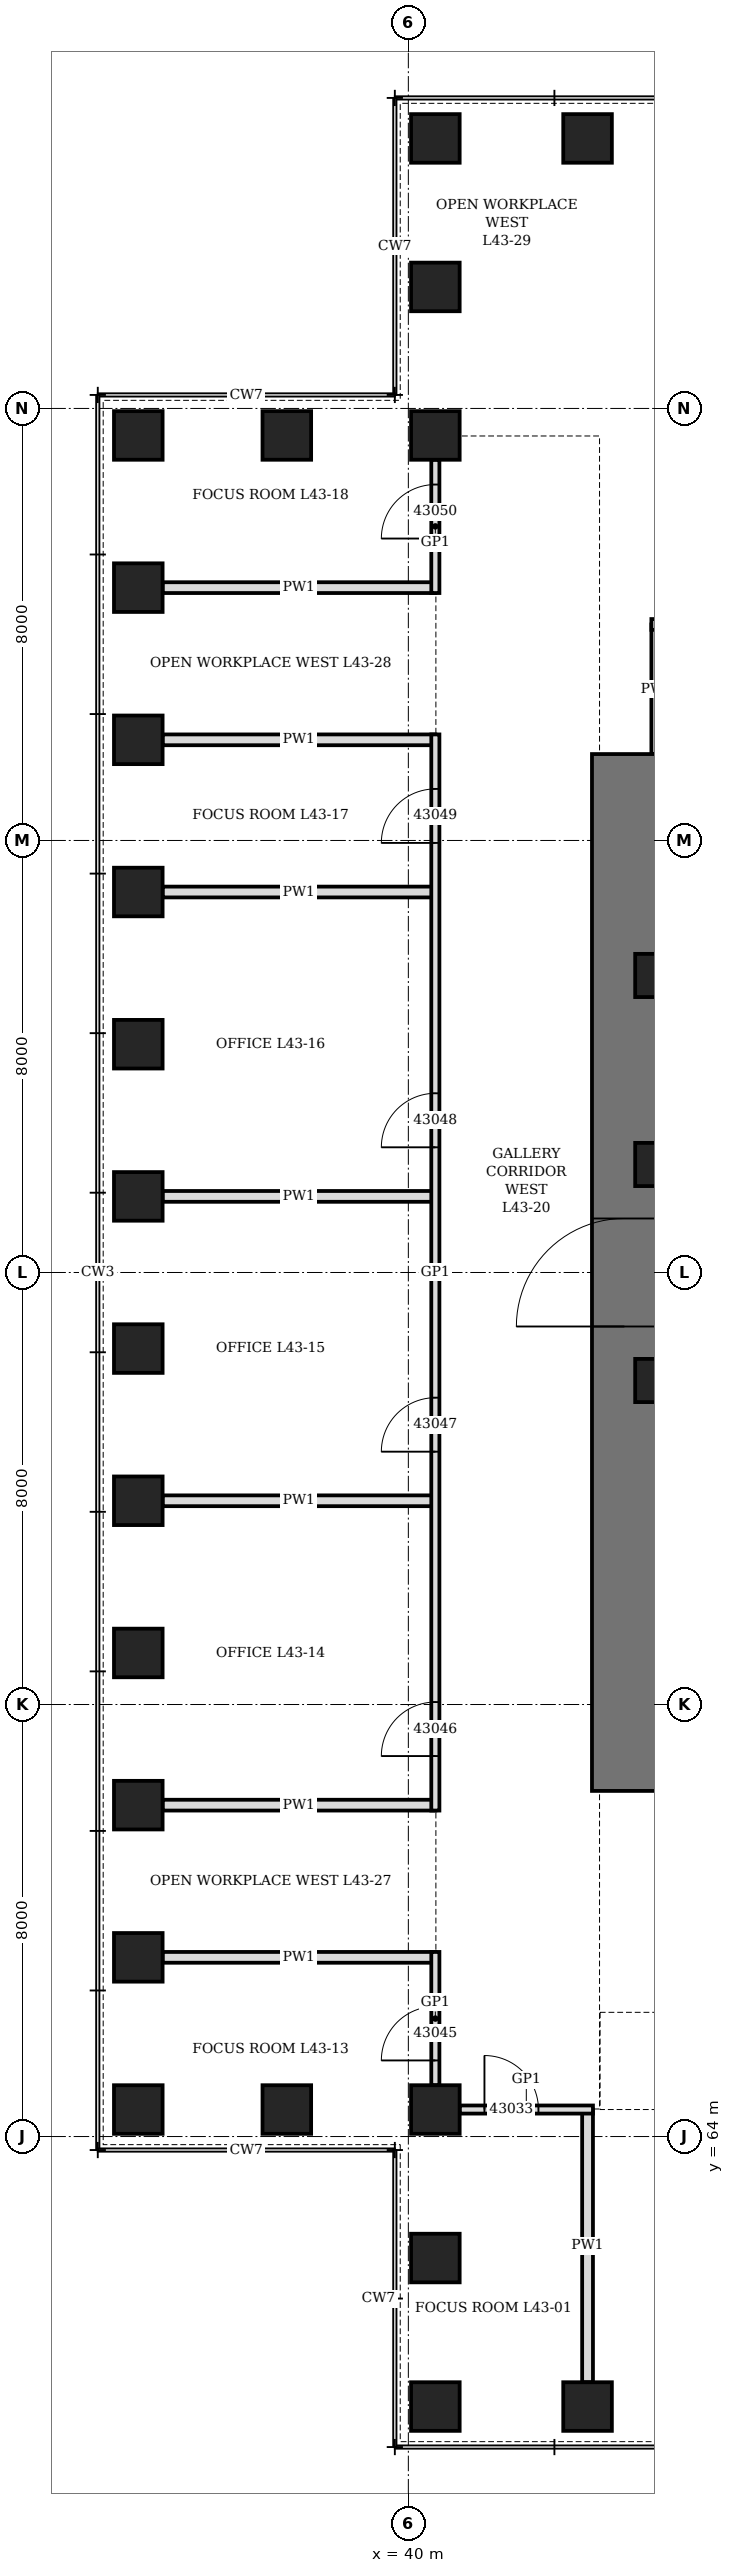
"""IFC4 building model, lengths in metres.
Left out: names, types, materials, properties, quantities, classifications, styles, units other than length and angle.
Written with IfcOpenShell. Run it as: python <this file> out.ifc"""

import sys

from ifc_helpers import new_model, si_unit, direction, frame, frame_2d, origin, origin_2d, place, context, subcontext, project, spatial, rectangle, hollow_rectangle, extrude, element, fill, save


model = new_model("IFC4")
c1 = context("Model", 3, precision=1e-05, world=origin(), true_north=direction((0.0, 1.0)))
c2 = subcontext(c1, "Body", "Model", "MODEL_VIEW")
j1 = project(units=[si_unit("LENGTHUNIT", "METRE"), si_unit("PLANEANGLEUNIT", "RADIAN")], contexts=[c1])
p1 = place(None, origin())
s1 = spatial("IfcSite", under=j1, at=p1, CompositionType="ELEMENT")
p2 = place(p1, origin())
s2 = spatial("IfcBuilding", under=s1, at=p2, CompositionType="ELEMENT")
p3 = place(p2, frame((0.0, 0.0, 193.9)))
s3 = spatial("IfcBuildingStorey", under=s2, at=p3, CompositionType="ELEMENT", Elevation=193.9)
for number, where, z_axis, x_axis in (
    (1, (40.5, 59.0, 0.0), (0.0, 0.0, 1.0), (1.0, 0.0, 0.0)),
    (2, (43.318, 59.0, 0.0), (0.0, 0.0, 1.0), (1.0, 0.0, 0.0)),
    (3, (43.318, 101.0, 0.0), (0.0, 0.0, 1.0), (1.0, 0.0, 0.0)),
    (4, (40.5, 101.0, 0.0), (0.0, 0.0, 1.0), (0.0, 1.0, 0.0)),
    (5, (40.5, 98.25, 0.0), (0.0, 0.0, 1.0), (0.0, 1.0, 0.0)),
    (6, (40.5, 95.5, 0.0), (0.0, 0.0, 1.0), (1.0, 0.0, 0.0)),
    (7, (37.75, 95.5, 0.0), (0.0, 0.0, 1.0), (1.0, 0.0, 0.0)),
    (8, (35.0, 95.5, 0.0), (0.0, 0.0, 1.0), (0.0, 1.0, 0.0)),
    (9, (35.0, 92.682, 0.0), (0.0, 0.0, 1.0), (0.0, 1.0, 0.0)),
    (10, (35.0, 89.864, 0.0), (0.0, 0.0, 1.0), (0.0, 1.0, 0.0)),
    (11, (35.0, 87.045, 0.0), (0.0, 0.0, 1.0), (0.0, 1.0, 0.0)),
    (12, (35.0, 84.227, 0.0), (0.0, 0.0, 1.0), (0.0, 1.0, 0.0)),
    (13, (35.0, 81.409, 0.0), (0.0, 0.0, 1.0), (0.0, 1.0, 0.0)),
    (14, (35.0, 78.591, 0.0), (0.0, 0.0, 1.0), (0.0, 1.0, 0.0)),
    (15, (35.0, 75.773, 0.0), (0.0, 0.0, 1.0), (0.0, 1.0, 0.0)),
    (16, (35.0, 72.955, 0.0), (0.0, 0.0, 1.0), (0.0, 1.0, 0.0)),
    (17, (35.0, 70.136, 0.0), (0.0, 0.0, 1.0), (0.0, 1.0, 0.0)),
    (18, (35.0, 67.318, 0.0), (0.0, 0.0, 1.0), (0.0, 1.0, 0.0)),
    (19, (35.0, 64.5, 0.0), (0.0, 0.0, 1.0), (1.0, 0.0, 0.0)),
    (20, (37.75, 64.5, 0.0), (0.0, 0.0, 1.0), (1.0, 0.0, 0.0)),
    (21, (40.5, 64.5, 0.0), (0.0, 0.0, 1.0), (0.0, 1.0, 0.0)),
    (22, (40.5, 61.75, 0.0), (0.0, 0.0, 1.0), (0.0, 1.0, 0.0)),
):
    element("IfcColumn", number, at=place(p3, frame(where, z_axis=z_axis, x_axis=x_axis)), inside=s3, PredefinedType="COLUMN", context=c2, shape_type="SweptSolid", body=[
        extrude(hollow_rectangle(XDim=0.9, YDim=0.9, WallThickness=0.12, at=origin_2d()), origin(), (0.0, 0.0, 1.0), 4.2),
    ])
p4 = place(p3, frame((44.0, 70.4, 0.0), z_axis=(0.0, 0.0, 1.0), x_axis=(0.0, 1.0, 0.0)))
e23 = element("IfcWall", 23, at=p4, inside=s3, PredefinedType="SHEAR", context=c2, shape_type="SweptSolid", body=[
    extrude(rectangle(XDim=19.2, YDim=1.2, at=frame_2d((9.6, 0.0))), origin(), (0.0, 0.0, 1.0), 4.2),
])
p5 = place(p4, frame((8.6, 0.0, 0.0)))
e24 = element("IfcOpeningElement", 24, at=p5, cuts=e23, PredefinedType="OPENING", context=c2, shape_type="SweptSolid", body=[
    extrude(rectangle(XDim=2.0, YDim=2.4, at=frame_2d((1.0, 1.2))), frame((0.0, 0.61, 0.0), z_axis=(0.0, -1.0, 0.0), x_axis=(1.0, 0.0, 0.0)), (0.0, 0.0, 1.0), 1.22),
])
for number, where, z_axis, x_axis in (
    (25, (44.6, 78.0, 0.0), (0.0, 0.0, 1.0), (1.0, 0.0, 0.0)),
    (26, (44.6, 82.0, 0.0), (0.0, 0.0, 1.0), (1.0, 0.0, 0.0)),
    (27, (44.6, 85.5, 0.0), (0.0, 0.0, 1.0), (1.0, 0.0, 0.0)),
):
    element("IfcColumn", number, at=place(p3, frame(where, z_axis=z_axis, x_axis=x_axis)), inside=s3, PredefinedType="COLUMN", context=c2, shape_type="SweptSolid", body=[
        extrude(hollow_rectangle(XDim=0.8, YDim=0.8, WallThickness=0.1, at=origin_2d()), origin(), (0.0, 0.0, 1.0), 4.2),
    ])
for number, where, z_axis, x_axis in (
    (28, (43.318, 59.45, 0.0), (0.0, 0.0, 1.0), (0.0, 1.0, 0.0)),
    (29, (35.45, 67.318, 0.0), (0.0, 0.0, 1.0), (1.0, 0.0, 0.0)),
    (30, (35.45, 70.136, 0.0), (0.0, 0.0, 1.0), (1.0, 0.0, 0.0)),
    (31, (35.45, 75.773, 0.0), (0.0, 0.0, 1.0), (1.0, 0.0, 0.0)),
    (32, (35.45, 81.409, 0.0), (0.0, 0.0, 1.0), (1.0, 0.0, 0.0)),
    (33, (35.45, 87.045, 0.0), (0.0, 0.0, 1.0), (1.0, 0.0, 0.0)),
    (34, (35.45, 89.864, 0.0), (0.0, 0.0, 1.0), (1.0, 0.0, 0.0)),
    (35, (35.45, 92.682, 0.0), (0.0, 0.0, 1.0), (1.0, 0.0, 0.0)),
):
    element("IfcWall", number, at=place(p3, frame(where, z_axis=z_axis, x_axis=x_axis)), inside=s3, PredefinedType="PARTITIONING", context=c2, shape_type="SweptSolid", body=[
        extrude(rectangle(XDim=5.05, YDim=0.2, at=frame_2d((2.525, 0.0))), origin(), (0.0, 0.0, 1.0), 3.428),
    ])
p6 = place(p3, frame((44.6, 89.6, 0.0), z_axis=(0.0, 0.0, 1.0), x_axis=(0.0, 1.0, 0.0)))
e36 = element("IfcWall", 36, at=p6, inside=s3, PredefinedType="PARTITIONING", context=c2, shape_type="SweptSolid", body=[
    extrude(rectangle(XDim=2.4, YDim=0.2, at=frame_2d((1.2, 0.0))), origin(), (0.0, 0.0, 1.0), 4.04),
])
p7 = place(p3, frame((40.95, 64.5, 0.0), z_axis=(0.0, 0.0, 1.0), x_axis=(1.0, 0.0, 0.0)))
e37 = element("IfcWall", 37, at=p7, inside=s3, PredefinedType="PARTITIONING", context=c2, shape_type="SweptSolid", body=[
    extrude(rectangle(XDim=2.468, YDim=0.15, at=frame_2d((1.234, 0.0))), origin(), (0.0, 0.0, 1.0), 4.04),
])
p8 = place(p7, frame((0.459, 0.0, 0.0)))
e38 = element("IfcOpeningElement", 38, at=p8, cuts=e37, PredefinedType="OPENING", context=c2, shape_type="SweptSolid", body=[
    extrude(rectangle(XDim=1.0, YDim=2.4, at=frame_2d((0.5, 1.2))), frame((0.0, 0.085, 0.0), z_axis=(0.0, -1.0, 0.0), x_axis=(1.0, 0.0, 0.0)), (0.0, 0.0, 1.0), 0.17),
])
p9 = place(p3, frame((44.5, 92.0, 0.0), z_axis=(0.0, 0.0, 1.0), x_axis=(1.0, 0.0, 0.0)))
e39 = element("IfcWall", 39, at=p9, inside=s3, PredefinedType="PARTITIONING", context=c2, shape_type="SweptSolid", body=[
    extrude(rectangle(XDim=6.4, YDim=0.2, at=frame_2d((3.2, 0.0))), origin(), (0.0, 0.0, 1.0), 4.04),
])
p10 = place(p9, frame((2.7, 0.0, 0.0)))
e40 = element("IfcOpeningElement", 40, at=p10, cuts=e39, PredefinedType="OPENING", context=c2, shape_type="SweptSolid", body=[
    extrude(rectangle(XDim=1.0, YDim=2.1, at=frame_2d((0.5, 1.05))), frame((0.0, 0.11, 0.0), z_axis=(0.0, -1.0, 0.0), x_axis=(1.0, 0.0, 0.0)), (0.0, 0.0, 1.0), 0.22),
])
p11 = place(p3, frame((40.5, 64.95, 0.0), z_axis=(0.0, 0.0, 1.0), x_axis=(0.0, 1.0, 0.0)))
e41 = element("IfcWall", 41, at=p11, inside=s3, PredefinedType="PARTITIONING", context=c2, shape_type="SweptSolid", body=[
    extrude(rectangle(XDim=2.468, YDim=0.15, at=frame_2d((1.234, 0.0))), origin(), (0.0, 0.0, 1.0), 4.04),
])
p12 = place(p11, frame((0.459, 0.0, 0.0)))
e42 = element("IfcOpeningElement", 42, at=p12, cuts=e41, PredefinedType="OPENING", context=c2, shape_type="SweptSolid", body=[
    extrude(rectangle(XDim=1.0, YDim=2.4, at=frame_2d((0.5, 1.2))), frame((0.0, 0.085, 0.0), z_axis=(0.0, -1.0, 0.0), x_axis=(1.0, 0.0, 0.0)), (0.0, 0.0, 1.0), 0.17),
])
p13 = place(p3, frame((40.5, 70.036, 0.0), z_axis=(0.0, 0.0, 1.0), x_axis=(0.0, 1.0, 0.0)))
e43 = element("IfcWall", 43, at=p13, inside=s3, PredefinedType="PARTITIONING", context=c2, shape_type="SweptSolid", body=[
    extrude(rectangle(XDim=19.927, YDim=0.15, at=frame_2d((9.964, 0.0))), origin(), (0.0, 0.0, 1.0), 4.04),
])
p14 = place(p13, frame((1.009, 0.0, 0.0)))
e44 = element("IfcOpeningElement", 44, at=p14, cuts=e43, PredefinedType="OPENING", context=c2, shape_type="SweptSolid", body=[
    extrude(rectangle(XDim=1.0, YDim=2.1, at=frame_2d((0.5, 1.05))), frame((0.0, 0.085, 0.0), z_axis=(0.0, -1.0, 0.0), x_axis=(1.0, 0.0, 0.0)), (0.0, 0.0, 1.0), 0.17),
])
p15 = place(p13, frame((6.646, 0.0, 0.0)))
e45 = element("IfcOpeningElement", 45, at=p15, cuts=e43, PredefinedType="OPENING", context=c2, shape_type="SweptSolid", body=[
    extrude(rectangle(XDim=1.0, YDim=2.1, at=frame_2d((0.5, 1.05))), frame((0.0, 0.085, 0.0), z_axis=(0.0, -1.0, 0.0), x_axis=(1.0, 0.0, 0.0)), (0.0, 0.0, 1.0), 0.17),
])
p16 = place(p13, frame((12.282, 0.0, 0.0)))
e46 = element("IfcOpeningElement", 46, at=p16, cuts=e43, PredefinedType="OPENING", context=c2, shape_type="SweptSolid", body=[
    extrude(rectangle(XDim=1.0, YDim=2.1, at=frame_2d((0.5, 1.05))), frame((0.0, 0.085, 0.0), z_axis=(0.0, -1.0, 0.0), x_axis=(1.0, 0.0, 0.0)), (0.0, 0.0, 1.0), 0.17),
])
p17 = place(p13, frame((17.918, 0.0, 0.0)))
e47 = element("IfcOpeningElement", 47, at=p17, cuts=e43, PredefinedType="OPENING", context=c2, shape_type="SweptSolid", body=[
    extrude(rectangle(XDim=1.0, YDim=2.4, at=frame_2d((0.5, 1.2))), frame((0.0, 0.085, 0.0), z_axis=(0.0, -1.0, 0.0), x_axis=(1.0, 0.0, 0.0)), (0.0, 0.0, 1.0), 0.17),
])
p18 = place(p3, frame((40.5, 92.582, 0.0), z_axis=(0.0, 0.0, 1.0), x_axis=(0.0, 1.0, 0.0)))
e48 = element("IfcWall", 48, at=p18, inside=s3, PredefinedType="PARTITIONING", context=c2, shape_type="SweptSolid", body=[
    extrude(rectangle(XDim=2.468, YDim=0.15, at=frame_2d((1.234, 0.0))), origin(), (0.0, 0.0, 1.0), 4.04),
])
p19 = place(p18, frame((1.009, 0.0, 0.0)))
e49 = element("IfcOpeningElement", 49, at=p19, cuts=e48, PredefinedType="OPENING", context=c2, shape_type="SweptSolid", body=[
    extrude(rectangle(XDim=1.0, YDim=2.4, at=frame_2d((0.5, 1.2))), frame((0.0, 0.085, 0.0), z_axis=(0.0, -1.0, 0.0), x_axis=(1.0, 0.0, 0.0)), (0.0, 0.0, 1.0), 0.17),
])
p20 = place(p5, origin())
e50 = element("IfcDoor", 50, at=p20, inside=s3, OperationType="DOUBLE_DOOR_SINGLE_SWING", PredefinedType="DOOR", context=c2, shape_type="SweptSolid", body=[
    extrude(rectangle(XDim=2.0, YDim=2.4, at=frame_2d((1.0, 1.2))), frame((0.0, 0.35, 0.0), z_axis=(0.0, -1.0, 0.0), x_axis=(1.0, 0.0, 0.0)), (0.0, 0.0, 1.0), 0.7),
])
fill(e24, e50)
p21 = place(p8, origin())
e51 = element("IfcDoor", 51, at=p21, inside=s3, OperationType="SINGLE_SWING_RIGHT", PredefinedType="DOOR", context=c2, shape_type="SweptSolid", body=[
    extrude(rectangle(XDim=1.0, YDim=2.4, at=frame_2d((0.5, 1.2))), frame((0.0, 0.075, 0.0), z_axis=(0.0, -1.0, 0.0), x_axis=(1.0, 0.0, 0.0)), (0.0, 0.0, 1.0), 0.149),
])
fill(e38, e51)
p22 = place(p12, origin())
e52 = element("IfcDoor", 52, at=p22, inside=s3, OperationType="SINGLE_SWING_RIGHT", PredefinedType="DOOR", context=c2, shape_type="SweptSolid", body=[
    extrude(rectangle(XDim=1.0, YDim=2.4, at=frame_2d((0.5, 1.2))), frame((0.0, 0.075, 0.0), z_axis=(0.0, -1.0, 0.0), x_axis=(1.0, 0.0, 0.0)), (0.0, 0.0, 1.0), 0.149),
])
fill(e42, e52)
p23 = place(p14, origin())
e53 = element("IfcDoor", 53, at=p23, inside=s3, OperationType="SINGLE_SWING_LEFT", PredefinedType="DOOR", context=c2, shape_type="SweptSolid", body=[
    extrude(rectangle(XDim=1.0, YDim=2.1, at=frame_2d((0.5, 1.05))), frame((0.0, 0.075, 0.0), z_axis=(0.0, -1.0, 0.0), x_axis=(1.0, 0.0, 0.0)), (0.0, 0.0, 1.0), 0.149),
])
fill(e44, e53)
p24 = place(p15, origin())
e54 = element("IfcDoor", 54, at=p24, inside=s3, OperationType="SINGLE_SWING_LEFT", PredefinedType="DOOR", context=c2, shape_type="SweptSolid", body=[
    extrude(rectangle(XDim=1.0, YDim=2.1, at=frame_2d((0.5, 1.05))), frame((0.0, 0.075, 0.0), z_axis=(0.0, -1.0, 0.0), x_axis=(1.0, 0.0, 0.0)), (0.0, 0.0, 1.0), 0.149),
])
fill(e45, e54)
p25 = place(p16, origin())
e55 = element("IfcDoor", 55, at=p25, inside=s3, OperationType="SINGLE_SWING_LEFT", PredefinedType="DOOR", context=c2, shape_type="SweptSolid", body=[
    extrude(rectangle(XDim=1.0, YDim=2.1, at=frame_2d((0.5, 1.05))), frame((0.0, 0.075, 0.0), z_axis=(0.0, -1.0, 0.0), x_axis=(1.0, 0.0, 0.0)), (0.0, 0.0, 1.0), 0.149),
])
fill(e46, e55)
p26 = place(p17, origin())
e56 = element("IfcDoor", 56, at=p26, inside=s3, OperationType="SINGLE_SWING_RIGHT", PredefinedType="DOOR", context=c2, shape_type="SweptSolid", body=[
    extrude(rectangle(XDim=1.0, YDim=2.4, at=frame_2d((0.5, 1.2))), frame((0.0, 0.075, 0.0), z_axis=(0.0, -1.0, 0.0), x_axis=(1.0, 0.0, 0.0)), (0.0, 0.0, 1.0), 0.149),
])
fill(e47, e56)
p27 = place(p19, origin())
e57 = element("IfcDoor", 57, at=p27, inside=s3, OperationType="SINGLE_SWING_RIGHT", PredefinedType="DOOR", context=c2, shape_type="SweptSolid", body=[
    extrude(rectangle(XDim=1.0, YDim=2.4, at=frame_2d((0.5, 1.2))), frame((0.0, 0.075, 0.0), z_axis=(0.0, -1.0, 0.0), x_axis=(1.0, 0.0, 0.0)), (0.0, 0.0, 1.0), 0.149),
])
fill(e49, e57)
save(model, sys.argv[1])
